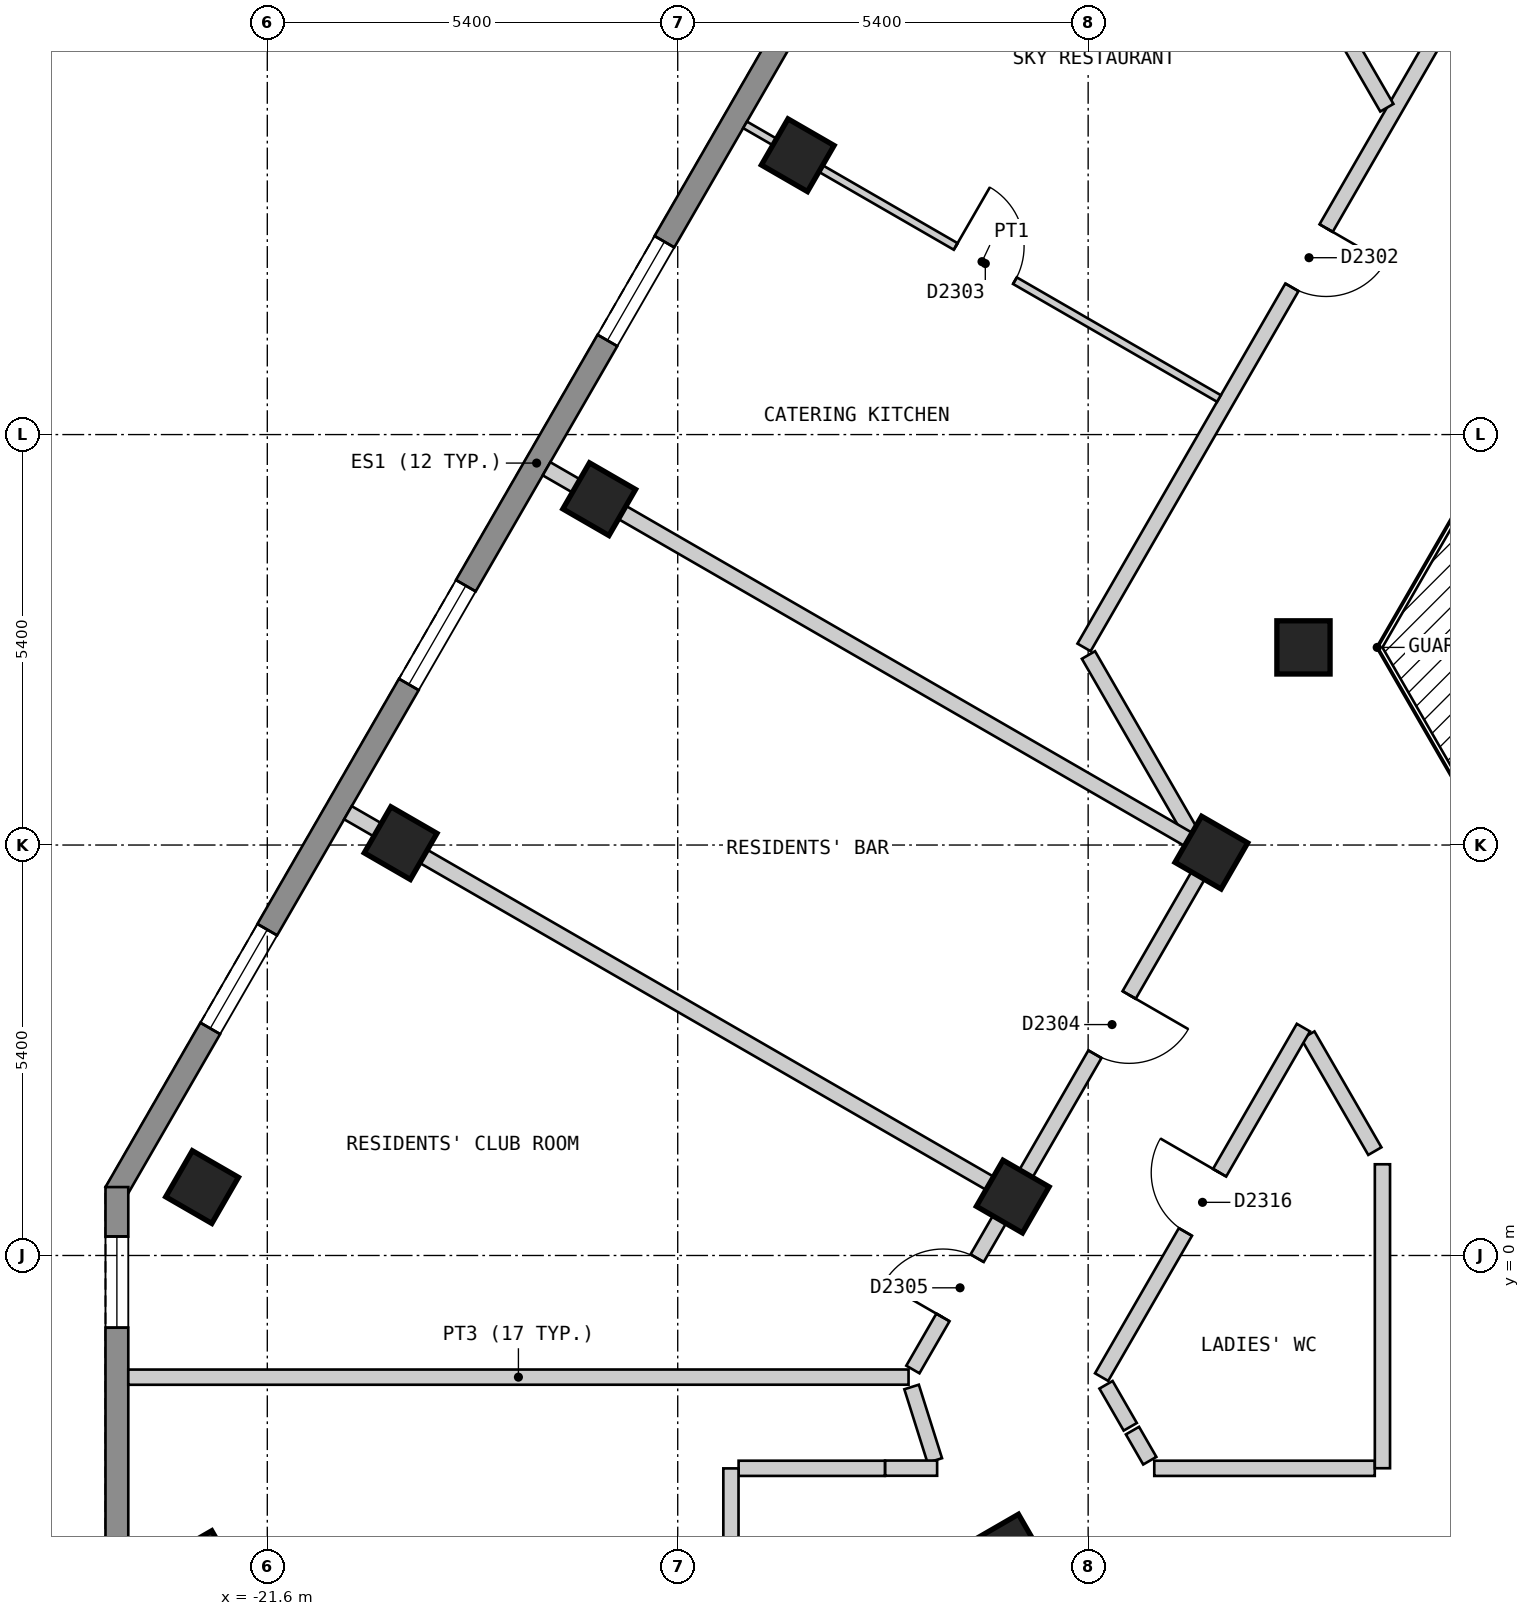
"""IFC4 building model, lengths in metres.
Left out: names, types, materials, properties, quantities, classifications, styles, units other than length and angle.
Written with IfcOpenShell. Run it as: python <this file> out.ifc"""

import sys

from ifc_helpers import new_model, si_unit, direction, frame, frame_2d, origin, origin_2d, place, context, subcontext, project, spatial, polyline, rectangle, outline, extrude, element, fill, save


model = new_model("IFC4")
c1 = context("Model", 3, precision=1e-05, world=origin(), true_north=direction((0.0, 1.0)))
c2 = subcontext(c1, "Body", "Model", "MODEL_VIEW")
j1 = project(units=[si_unit("LENGTHUNIT", "METRE"), si_unit("PLANEANGLEUNIT", "RADIAN")], contexts=[c1])
p1 = place(None, origin())
s1 = spatial("IfcSite", under=j1, at=p1, CompositionType="ELEMENT")
p2 = place(p1, origin())
s2 = spatial("IfcBuilding", under=s1, at=p2, CompositionType="ELEMENT")
p3 = place(p2, frame((0.0, 0.0, 241.8)))
s3 = spatial("IfcBuildingStorey", under=s2, at=p3, CompositionType="ELEMENT", Elevation=241.8)
for number, where, z_axis, x_axis in (
    (1, (-14.621, 14.475, 0.0), (0.0, 0.0, 1.0), (-0.5, -0.866, 0.0)),
    (2, (-17.233, 9.95, 0.0), (0.0, 0.0, 1.0), (-0.5, -0.866, 0.0)),
    (3, (-19.846, 5.425, 0.0), (0.0, 0.0, 1.0), (-0.5, -0.866, 0.0)),
    (4, (-22.458, 0.9, 0.0), (0.0, 0.0, 1.0), (-0.5, -0.866, 0.0)),
    (5, (-22.459, -4.1, 0.0), (0.0, 0.0, 1.0), (0.5, -0.866, 0.0)),
    (6, (-11.845, -3.883, 0.0), (0.0, 0.0, 1.0), (0.5, -0.866, 0.0)),
    (7, (-7.967, 8.0, 0.0), (0.0, 0.0, 1.0), (1.0, 0.0, 0.0)),
    (8, (-9.179, 5.3, 0.0), (0.0, 0.0, 1.0), (-0.5, -0.866, 0.0)),
    (9, (-11.792, 0.775, 0.0), (0.0, 0.0, 1.0), (-0.5, -0.866, 0.0)),
):
    element("IfcColumn", number, at=place(p3, frame(where, z_axis=z_axis, x_axis=x_axis)), inside=s3, PredefinedType="COLUMN", context=c2, shape_type="SweptSolid", body=[
        extrude(rectangle(XDim=0.7, YDim=0.7, at=origin_2d()), origin(), (0.0, 0.0, 1.0), 3.0),
    ])
p4 = place(p3, frame((-12.514, 20.025, 0.0), z_axis=(0.0, 0.0, 1.0), x_axis=(-0.500003656944, -0.866023292436, 0.0)))
e10 = element("IfcWall", 10, at=p4, inside=s3, PredefinedType="SOLIDWALL", context=c2, shape_type="SweptSolid", body=[
    extrude(outline(polyline([(0.0, -0.15), (22.17, -0.15), (22.09, 0.15), (0.08, 0.15), (0.0, -0.15)])), origin(), (0.0, 0.0, 1.0), 2.2),
])
p5 = place(p4, frame((2.497, 0.0, 0.15)))
e11 = element("IfcOpeningElement", 11, at=p5, cuts=e10, PredefinedType="OPENING", context=c2, shape_type="SweptSolid", body=[
    extrude(rectangle(XDim=1.5, YDim=2.1, at=frame_2d((0.75, 1.05))), frame((0.0, 0.16, 0.0), z_axis=(0.0, -1.0, 0.0), x_axis=(1.0, 0.0, 0.0)), (0.0, 0.0, 1.0), 0.32),
])
p6 = place(p4, frame((7.722, 0.0, 0.15)))
e12 = element("IfcOpeningElement", 12, at=p6, cuts=e10, PredefinedType="OPENING", context=c2, shape_type="SweptSolid", body=[
    extrude(rectangle(XDim=1.5, YDim=2.1, at=frame_2d((0.75, 1.05))), frame((0.0, 0.16, 0.0), z_axis=(0.0, -1.0, 0.0), x_axis=(1.0, 0.0, 0.0)), (0.0, 0.0, 1.0), 0.32),
])
p7 = place(p4, frame((12.948, 0.0, 0.15)))
e13 = element("IfcOpeningElement", 13, at=p7, cuts=e10, PredefinedType="OPENING", context=c2, shape_type="SweptSolid", body=[
    extrude(rectangle(XDim=1.5, YDim=2.1, at=frame_2d((0.75, 1.05))), frame((0.0, 0.16, 0.0), z_axis=(0.0, -1.0, 0.0), x_axis=(1.0, 0.0, 0.0)), (0.0, 0.0, 1.0), 0.32),
])
p8 = place(p4, frame((18.173, 0.0, 0.15)))
e14 = element("IfcOpeningElement", 14, at=p8, cuts=e10, PredefinedType="OPENING", context=c2, shape_type="SweptSolid", body=[
    extrude(rectangle(XDim=1.5, YDim=2.1, at=frame_2d((0.75, 1.05))), frame((0.0, 0.16, 0.0), z_axis=(0.0, -1.0, 0.0), x_axis=(1.0, 0.0, 0.0)), (0.0, 0.0, 1.0), 0.32),
])
p9 = place(p3, frame((-23.579, 0.9, 0.0), z_axis=(0.0, 0.0, 1.0), x_axis=(0.0, -1.0, 0.0)))
e15 = element("IfcWall", 15, at=p9, inside=s3, PredefinedType="SOLIDWALL", context=c2, shape_type="SweptSolid", body=[
    extrude(outline(polyline([(0.0, -0.15), (5.0, -0.15), (4.92, 0.15), (0.08, 0.15), (0.0, -0.15)])), origin(), (0.0, 0.0, 1.0), 2.2),
])
p10 = place(p9, frame((0.65, 0.0, 0.15)))
e16 = element("IfcOpeningElement", 16, at=p10, cuts=e15, PredefinedType="OPENING", context=c2, shape_type="SweptSolid", body=[
    extrude(rectangle(XDim=1.2, YDim=2.1, at=frame_2d((0.6, 1.05))), frame((0.0, 0.16, 0.0), z_axis=(0.0, -1.0, 0.0), x_axis=(1.0, 0.0, 0.0)), (0.0, 0.0, 1.0), 0.32),
])
p11 = place(p3, frame((-10.796, 7.9, 0.0), z_axis=(0.0, 0.0, 1.0), x_axis=(0.499698840221, -0.866199208659, 0.0)))
e17 = element("IfcWall", 17, at=p11, inside=s3, PredefinedType="PARTITIONING", context=c2, shape_type="SweptSolid", body=[
    extrude(rectangle(XDim=2.685, YDim=0.2, at=frame_2d((1.343, 0.0))), origin(), (0.0, 0.0, 1.0), 2.2),
])
p12 = place(p3, frame((-7.909, 2.898, 0.0), z_axis=(0.0, 0.0, 1.0), x_axis=(0.50019444547, -0.865913111531, 0.0)))
e18 = element("IfcWall", 18, at=p12, inside=s3, PredefinedType="PARTITIONING", context=c2, shape_type="SweptSolid", body=[
    extrude(rectangle(XDim=1.761, YDim=0.2, at=frame_2d((0.88, 0.0))), origin(), (0.0, 0.0, 1.0), 2.2),
])
p13 = place(p3, frame((-10.565, -1.701, 0.0), z_axis=(0.0, 0.0, 1.0), x_axis=(0.499512735409, -0.866306543416, 0.0)))
e19 = element("IfcWall", 19, at=p13, inside=s3, PredefinedType="PARTITIONING", context=c2, shape_type="SweptSolid", body=[
    extrude(rectangle(XDim=0.638, YDim=0.2, at=frame_2d((0.319, 0.0))), origin(), (0.0, 0.0, 1.0), 2.2),
])
p14 = place(p3, frame((-10.217, -2.304, 0.0), z_axis=(0.0, 0.0, 1.0), x_axis=(0.499013081552, -0.866594452117, 0.0)))
e20 = element("IfcWall", 20, at=p14, inside=s3, PredefinedType="PARTITIONING", context=c2, shape_type="SweptSolid", body=[
    extrude(rectangle(XDim=0.457, YDim=0.2, at=frame_2d((0.229, 0.0))), origin(), (0.0, 0.0, 1.0), 2.2),
])
p15 = place(p3, frame((-13.123, -1.73, 0.0), z_axis=(0.0, 0.0, 1.0), x_axis=(0.300728027646, -0.953709941957, 0.0)))
e21 = element("IfcWall", 21, at=p15, inside=s3, PredefinedType="PARTITIONING", context=c2, shape_type="SweptSolid", body=[
    extrude(rectangle(XDim=1.014, YDim=0.2, at=frame_2d((0.507, 0.0))), origin(), (0.0, 0.0, 1.0), 2.2),
])
p16 = place(p3, frame((-13.472, -2.798, 0.0), z_axis=(0.0, 0.0, 1.0), x_axis=(1.0, 0.0, 0.0)))
e22 = element("IfcWall", 22, at=p16, inside=s3, PredefinedType="PARTITIONING", context=c2, shape_type="SweptSolid", body=[
    extrude(rectangle(XDim=0.685, YDim=0.2, at=frame_2d((0.342, 0.0))), origin(), (0.0, 0.0, 1.0), 2.2),
])
p17 = place(p3, frame((-15.399, -2.8, 0.0), z_axis=(0.0, 0.0, 1.0), x_axis=(1.0, 0.0, 0.0)))
e23 = element("IfcWall", 23, at=p17, inside=s3, PredefinedType="PARTITIONING", context=c2, shape_type="SweptSolid", body=[
    extrude(rectangle(XDim=1.925, YDim=0.2, at=frame_2d((0.962, 0.0))), origin(), (0.0, 0.0, 1.0), 2.2),
])
p18 = place(p3, frame((-9.93, -2.8, 0.0), z_axis=(0.0, 0.0, 1.0), x_axis=(1.0, 0.0, 0.0)))
e24 = element("IfcWall", 24, at=p18, inside=s3, PredefinedType="PARTITIONING", context=c2, shape_type="SweptSolid", body=[
    extrude(rectangle(XDim=2.901, YDim=0.2, at=frame_2d((1.45, 0.0))), origin(), (0.0, 0.0, 1.0), 2.2),
])
p19 = place(p3, frame((-10.623, -1.6, 0.0), z_axis=(0.0, 0.0, 1.0), x_axis=(0.500040865889, 0.866001808567, 0.0)))
e25 = element("IfcWall", 25, at=p19, inside=s3, PredefinedType="PARTITIONING", context=c2, shape_type="SweptSolid", body=[
    extrude(rectangle(XDim=5.31, YDim=0.2, at=frame_2d((2.655, 0.0))), origin(), (0.0, 0.0, 1.0), 2.2),
])
p20 = place(p19, frame((2.205, 0.0, 0.0)))
e26 = element("IfcOpeningElement", 26, at=p20, cuts=e25, PredefinedType="OPENING", context=c2, shape_type="SweptSolid", body=[
    extrude(rectangle(XDim=0.9, YDim=2.1, at=frame_2d((0.45, 1.05))), frame((0.0, 0.11, 0.0), z_axis=(0.0, -1.0, 0.0), x_axis=(1.0, 0.0, 0.0)), (0.0, 0.0, 1.0), 0.22),
])
p21 = place(p3, frame((-13.106, -1.5, 0.0), z_axis=(0.0, 0.0, 1.0), x_axis=(0.500025705601, 0.86601056214, 0.0)))
e27 = element("IfcWall", 27, at=p21, inside=s3, PredefinedType="PARTITIONING", context=c2, shape_type="SweptSolid", body=[
    extrude(rectangle(XDim=7.735, YDim=0.2, at=frame_2d((3.868, 0.0))), origin(), (0.0, 0.0, 1.0), 2.2),
])
p22 = place(p21, frame((4.79, 0.0, 0.0)))
e28 = element("IfcOpeningElement", 28, at=p22, cuts=e27, PredefinedType="OPENING", context=c2, shape_type="SweptSolid", body=[
    extrude(rectangle(XDim=0.9, YDim=2.1, at=frame_2d((0.45, 1.05))), frame((0.0, 0.11, 0.0), z_axis=(0.0, -1.0, 0.0), x_axis=(1.0, 0.0, 0.0)), (0.0, 0.0, 1.0), 0.22),
])
p23 = place(p21, frame((0.791, 0.0, 0.0)))
e29 = element("IfcOpeningElement", 29, at=p23, cuts=e27, PredefinedType="OPENING", context=c2, shape_type="SweptSolid", body=[
    extrude(rectangle(XDim=0.9, YDim=2.1, at=frame_2d((0.45, 1.05))), frame((0.0, 0.11, 0.0), z_axis=(0.0, -1.0, 0.0), x_axis=(1.0, 0.0, 0.0)), (0.0, 0.0, 1.0), 0.22),
])
p24 = place(p3, frame((-10.854, 8.0, 0.0), z_axis=(0.0, 0.0, 1.0), x_axis=(0.499997637144, 0.866026767976, 0.0)))
e30 = element("IfcWall", 30, at=p24, inside=s3, PredefinedType="PARTITIONING", context=c2, shape_type="SweptSolid", body=[
    extrude(rectangle(XDim=10.854, YDim=0.2, at=frame_2d((5.427, 0.0))), origin(), (0.0, 0.0, 1.0), 2.2),
])
p25 = place(p24, frame((5.47, 0.0, 0.0)))
e31 = element("IfcOpeningElement", 31, at=p25, cuts=e30, PredefinedType="OPENING", context=c2, shape_type="SweptSolid", body=[
    extrude(rectangle(XDim=0.9, YDim=2.1, at=frame_2d((0.45, 1.05))), frame((0.0, 0.11, 0.0), z_axis=(0.0, -1.0, 0.0), x_axis=(1.0, 0.0, 0.0)), (0.0, 0.0, 1.0), 0.22),
])
p26 = place(p3, frame((-6.928, -2.799, 0.0), z_axis=(0.0, 0.0, 1.0), x_axis=(0.0, 1.0, 0.0)))
e32 = element("IfcWall", 32, at=p26, inside=s3, PredefinedType="PARTITIONING", context=c2, shape_type="SweptSolid", body=[
    extrude(rectangle(XDim=3.999, YDim=0.2, at=frame_2d((2.0, 0.0))), origin(), (0.0, 0.0, 1.0), 2.2),
])
p27 = place(p3, frame((-15.5, -6.599, 0.0), z_axis=(0.0, 0.0, 1.0), x_axis=(0.0, 1.0, 0.0)))
e33 = element("IfcWall", 33, at=p27, inside=s3, PredefinedType="PARTITIONING", context=c2, shape_type="SweptSolid", body=[
    extrude(rectangle(XDim=3.798, YDim=0.2, at=frame_2d((1.899, 0.0))), origin(), (0.0, 0.0, 1.0), 2.2),
])
p28 = place(p27, frame((1.541, 0.0, 0.0)))
e34 = element("IfcOpeningElement", 34, at=p28, cuts=e33, PredefinedType="OPENING", context=c2, shape_type="SweptSolid", body=[
    extrude(rectangle(XDim=0.9, YDim=2.1, at=frame_2d((0.45, 1.05))), frame((0.0, 0.11, 0.0), z_axis=(0.0, -1.0, 0.0), x_axis=(1.0, 0.0, 0.0)), (0.0, 0.0, 1.0), 0.22),
])
p29 = place(p3, frame((-15.314, 14.875, 0.0), z_axis=(0.0, 0.0, 1.0), x_axis=(0.866001485781, -0.500041424909, 0.0)))
e35 = element("IfcWall", 35, at=p29, inside=s3, PredefinedType="PARTITIONING", context=c2, shape_type="SweptSolid", body=[
    extrude(rectangle(XDim=7.2, YDim=0.1, at=frame_2d((3.6, 0.0))), origin(), (0.0, 0.0, 1.0), 2.2),
])
p30 = place(p29, frame((3.2, 0.0, 0.0)))
e36 = element("IfcOpeningElement", 36, at=p30, cuts=e35, PredefinedType="OPENING", context=c2, shape_type="SweptSolid", body=[
    extrude(rectangle(XDim=0.9, YDim=2.1, at=frame_2d((0.45, 1.05))), frame((0.0, 0.06, 0.0), z_axis=(0.0, -1.0, 0.0), x_axis=(1.0, 0.0, 0.0)), (0.0, 0.0, 1.0), 0.12),
])
p31 = place(p3, frame((-7.578, 16.325, 0.0), z_axis=(0.0, 0.0, 1.0), x_axis=(0.500314976313, -0.865843475737, 0.0)))
e37 = element("IfcWall", 37, at=p31, inside=s3, PredefinedType="PARTITIONING", context=c2, shape_type="SweptSolid", body=[
    extrude(rectangle(XDim=1.415, YDim=0.2, at=frame_2d((0.707, 0.0))), origin(), (0.0, 0.0, 1.0), 2.2),
])
p32 = place(p3, frame((-20.539, 5.825, 0.0), z_axis=(0.0, 0.0, 1.0), x_axis=(0.866089650643, -0.499888704662, 0.0)))
e38 = element("IfcWall", 38, at=p32, inside=s3, PredefinedType="PARTITIONING", context=c2, shape_type="SweptSolid", body=[
    extrude(rectangle(XDim=10.0, YDim=0.2, at=frame_2d((5.0, 0.0))), origin(), (0.0, 0.0, 1.0), 2.2),
])
p33 = place(p3, frame((-17.926, 10.35, 0.0), z_axis=(0.0, 0.0, 1.0), x_axis=(0.866018411306, -0.500012111133, 0.0)))
e39 = element("IfcWall", 39, at=p33, inside=s3, PredefinedType="PARTITIONING", context=c2, shape_type="SweptSolid", body=[
    extrude(rectangle(XDim=9.898, YDim=0.2, at=frame_2d((4.949, 0.0))), origin(), (0.0, 0.0, 1.0), 2.2),
])
p34 = place(p3, frame((-23.429, -1.601, 0.0), z_axis=(0.0, 0.0, 1.0), x_axis=(0.999999995475, 9.5127113e-05, 0.0)))
e40 = element("IfcWall", 40, at=p34, inside=s3, PredefinedType="PARTITIONING", context=c2, shape_type="SweptSolid", body=[
    extrude(rectangle(XDim=10.266, YDim=0.2, at=frame_2d((5.133, 0.0))), origin(), (0.0, 0.0, 1.0), 2.2),
])
p35 = place(p6, origin())
e41 = element("IfcWindow", 41, at=p35, inside=s3, PartitioningType="SINGLE_PANEL", PredefinedType="WINDOW", context=c2, shape_type="SweptSolid", body=[
    extrude(rectangle(XDim=1.5, YDim=2.1, at=frame_2d((0.75, 1.05))), frame((0.0, 0.03, 0.0), z_axis=(0.0, -1.0, 0.0), x_axis=(1.0, 0.0, 0.0)), (0.0, 0.0, 1.0), 0.06),
])
fill(e12, e41)
p36 = place(p7, origin())
e42 = element("IfcWindow", 42, at=p36, inside=s3, PartitioningType="SINGLE_PANEL", PredefinedType="WINDOW", context=c2, shape_type="SweptSolid", body=[
    extrude(rectangle(XDim=1.5, YDim=2.1, at=frame_2d((0.75, 1.05))), frame((0.0, 0.03, 0.0), z_axis=(0.0, -1.0, 0.0), x_axis=(1.0, 0.0, 0.0)), (0.0, 0.0, 1.0), 0.06),
])
fill(e13, e42)
p37 = place(p8, origin())
e43 = element("IfcWindow", 43, at=p37, inside=s3, PartitioningType="SINGLE_PANEL", PredefinedType="WINDOW", context=c2, shape_type="SweptSolid", body=[
    extrude(rectangle(XDim=1.5, YDim=2.1, at=frame_2d((0.75, 1.05))), frame((0.0, 0.03, 0.0), z_axis=(0.0, -1.0, 0.0), x_axis=(1.0, 0.0, 0.0)), (0.0, 0.0, 1.0), 0.06),
])
fill(e14, e43)
p38 = place(p10, origin())
e44 = element("IfcWindow", 44, at=p38, inside=s3, PartitioningType="SINGLE_PANEL", PredefinedType="WINDOW", context=c2, shape_type="SweptSolid", body=[
    extrude(rectangle(XDim=1.2, YDim=2.1, at=frame_2d((0.6, 1.05))), frame((0.0, 0.03, 0.0), z_axis=(0.0, -1.0, 0.0), x_axis=(1.0, 0.0, 0.0)), (0.0, 0.0, 1.0), 0.06),
])
fill(e16, e44)
p39 = place(p25, origin())
e45 = element("IfcDoor", 45, at=p39, inside=s3, OperationType="SINGLE_SWING_RIGHT", PredefinedType="DOOR", context=c2, shape_type="SweptSolid", body=[
    extrude(rectangle(XDim=0.9, YDim=2.1, at=frame_2d((0.45, 1.05))), frame((0.0, 0.025, 0.0), z_axis=(0.0, -1.0, 0.0), x_axis=(1.0, 0.0, 0.0)), (0.0, 0.0, 1.0), 0.05),
])
fill(e31, e45)
p40 = place(p30, origin())
e46 = element("IfcDoor", 46, at=p40, inside=s3, OperationType="SINGLE_SWING_LEFT", PredefinedType="DOOR", context=c2, shape_type="SweptSolid", body=[
    extrude(rectangle(XDim=0.9, YDim=2.1, at=frame_2d((0.45, 1.05))), frame((0.0, 0.025, 0.0), z_axis=(0.0, -1.0, 0.0), x_axis=(1.0, 0.0, 0.0)), (0.0, 0.0, 1.0), 0.05),
])
fill(e36, e46)
p41 = place(p22, origin())
e47 = element("IfcDoor", 47, at=p41, inside=s3, OperationType="SINGLE_SWING_RIGHT", PredefinedType="DOOR", context=c2, shape_type="SweptSolid", body=[
    extrude(rectangle(XDim=0.9, YDim=2.1, at=frame_2d((0.45, 1.05))), frame((0.0, 0.025, 0.0), z_axis=(0.0, -1.0, 0.0), x_axis=(1.0, 0.0, 0.0)), (0.0, 0.0, 1.0), 0.05),
])
fill(e28, e47)
p42 = place(p23, origin())
e48 = element("IfcDoor", 48, at=p42, inside=s3, OperationType="SINGLE_SWING_LEFT", PredefinedType="DOOR", context=c2, shape_type="SweptSolid", body=[
    extrude(rectangle(XDim=0.9, YDim=2.1, at=frame_2d((0.45, 1.05))), frame((0.0, 0.025, 0.0), z_axis=(0.0, -1.0, 0.0), x_axis=(1.0, 0.0, 0.0)), (0.0, 0.0, 1.0), 0.05),
])
fill(e29, e48)
p43 = place(p20, origin())
e49 = element("IfcDoor", 49, at=p43, inside=s3, OperationType="SINGLE_SWING_RIGHT", PredefinedType="DOOR", context=c2, shape_type="SweptSolid", body=[
    extrude(rectangle(XDim=0.9, YDim=2.1, at=frame_2d((0.45, 1.05))), frame((0.0, 0.025, 0.0), z_axis=(0.0, -1.0, 0.0), x_axis=(1.0, 0.0, 0.0)), (0.0, 0.0, 1.0), 0.05),
])
fill(e26, e49)
save(model, sys.argv[1])
